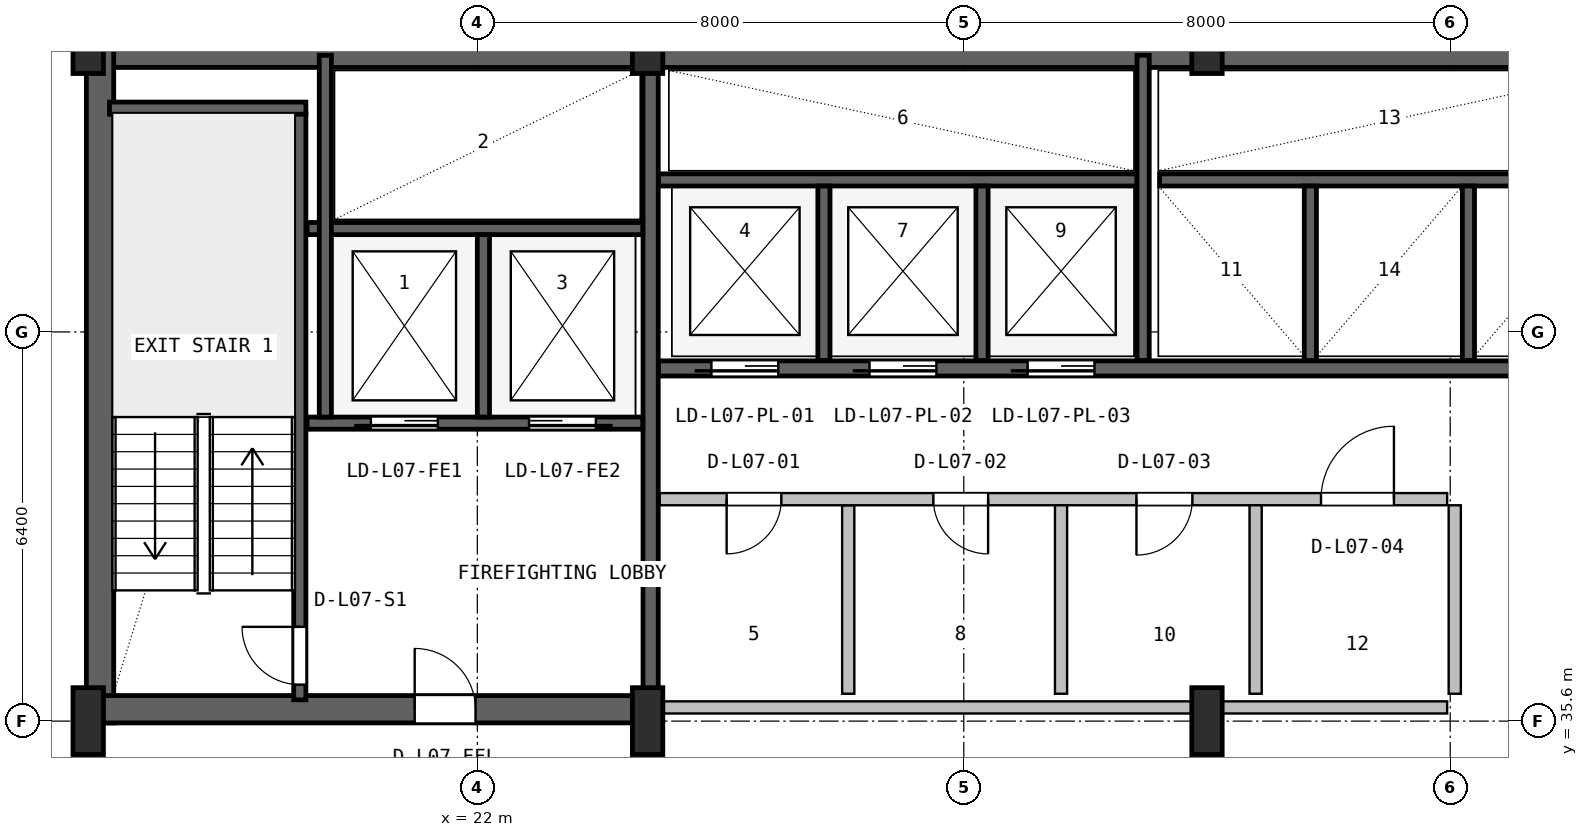
"""IFC4 building model, lengths in metres.
Left out: names, types, materials, properties, quantities, classifications, styles, units other than length and angle.
Written with IfcOpenShell. Run it as: python <this file> out.ifc"""

import sys

from ifc_helpers import new_model, si_unit, direction, frame, frame_2d, origin, origin_2d, place, context, subcontext, project, spatial, rectangle, i_section, extrude, source, transform, mapped, element, fill, save


model = new_model("IFC4")
c1 = context("Model", 3, precision=1e-05, world=origin(), true_north=direction((0.0, 1.0)))
c2 = subcontext(c1, "Body", "Model", "MODEL_VIEW")
j1 = project(units=[si_unit("LENGTHUNIT", "METRE"), si_unit("PLANEANGLEUNIT", "RADIAN")], contexts=[c1])
p1 = place(None, origin())
s1 = spatial("IfcSite", under=j1, at=p1, CompositionType="ELEMENT")
p2 = place(p1, origin())
s2 = spatial("IfcBuilding", under=s1, at=p2, CompositionType="ELEMENT")
p3 = place(p2, frame((0.0, 0.0, 35.4)))
s3 = spatial("IfcBuildingStorey", under=s2, at=p3, CompositionType="ELEMENT", Elevation=35.4)
p4 = place(p3, frame((15.6, 46.575, 0.0), z_axis=(0.0, 0.0, 1.0), x_axis=(1.0, 0.0, 0.0)))
e1 = element("IfcWall", 1, at=p4, inside=s3, PredefinedType="SHEAR", context=c2, shape_type="SweptSolid", body=[
    extrude(rectangle(XDim=36.8, YDim=0.45, at=frame_2d((18.4, 0.0))), origin(), (0.0, 0.0, 1.0), 3.65),
])
p5 = place(p3, frame((15.795, 35.57, 0.0), z_axis=(0.0, 0.0, 1.0), x_axis=(0.0, 1.0, 0.0)))
e2 = element("IfcWall", 2, at=p5, inside=s3, PredefinedType="SHEAR", context=c2, shape_type="SweptSolid", body=[
    extrude(rectangle(XDim=11.23, YDim=0.45, at=frame_2d((5.615, 0.0))), origin(), (0.0, 0.0, 1.0), 3.65),
])
p6 = place(p3, frame((15.57, 35.795, 0.0), z_axis=(0.0, 0.0, 1.0), x_axis=(1.0, 0.0, 0.0)))
e3 = element("IfcWall", 3, at=p6, inside=s3, PredefinedType="SHEAR", context=c2, shape_type="SweptSolid", body=[
    extrude(rectangle(XDim=9.23, YDim=0.45, at=frame_2d((4.615, 0.0))), origin(), (0.0, 0.0, 1.0), 3.65),
])
p7 = place(p6, frame((5.4, 0.0, 0.0)))
e4 = element("IfcOpeningElement", 4, at=p7, cuts=e3, PredefinedType="OPENING", context=c2, shape_type="SweptSolid", body=[
    extrude(rectangle(XDim=1.0, YDim=2.1, at=frame_2d((0.5, 1.05))), frame((0.0, 0.235, 0.0), z_axis=(0.0, -1.0, 0.0), x_axis=(1.0, 0.0, 0.0)), (0.0, 0.0, 1.0), 0.47),
])
m1 = source(origin(), c2, "Body", "SweptSolid", [
    extrude(i_section(OverallWidth=0.5, OverallDepth=1.1, WebThickness=0.018, FlangeThickness=0.032, FilletRadius=0.018, at=origin_2d()), origin(), (0.0, 0.0, 1.0), 3.9),
])
for number, where, z_axis, x_axis in (
    (5, (15.6, 35.6, 0.0), (0.0, 0.0, 1.0), (1.0, 0.0, 0.0)),
    (6, (15.6, 46.8, 0.0), (0.0, 0.0, 1.0), (1.0, 0.0, 0.0)),
    (7, (24.8, 35.6, 0.0), (0.0, 0.0, 1.0), (1.0, 0.0, 0.0)),
    (8, (24.8, 46.8, 0.0), (0.0, 0.0, 1.0), (1.0, 0.0, 0.0)),
    (9, (34.0, 35.6, 0.0), (0.0, 0.0, 1.0), (1.0, 0.0, 0.0)),
    (10, (34.0, 46.8, 0.0), (0.0, 0.0, 1.0), (1.0, 0.0, 0.0)),
):
    element("IfcColumn", number, at=place(p3, frame(where, z_axis=z_axis, x_axis=x_axis)), inside=s3, PredefinedType="COLUMN", context=c2, shape_type="MappedRepresentation", body=[
        mapped(m1, transform((0.0, 0.0, 0.0), x_axis=(1.0, 0.0, 0.0), y_axis=(0.0, 1.0, 0.0), z_axis=(0.0, 0.0, 1.0), scale=1.0)),
    ])
p8 = place(p3, frame((19.08, 35.95, 0.0), z_axis=(0.0, 0.0, 1.0), x_axis=(0.0, 1.0, 0.0)))
e11 = element("IfcWall", 11, at=p8, inside=s3, PredefinedType="SHEAR", context=c2, shape_type="SweptSolid", body=[
    extrude(rectangle(XDim=9.65, YDim=0.2, at=frame_2d((4.825, 0.0))), origin(), (0.0, 0.0, 1.0), 3.65),
])
p9 = place(p8, frame((0.25, 0.0, 0.0)))
e12 = element("IfcOpeningElement", 12, at=p9, cuts=e11, PredefinedType="OPENING", context=c2, shape_type="SweptSolid", body=[
    extrude(rectangle(XDim=0.95, YDim=2.1, at=frame_2d((0.475, 1.05))), frame((0.0, 0.11, 0.0), z_axis=(0.0, -1.0, 0.0), x_axis=(1.0, 0.0, 0.0)), (0.0, 0.0, 1.0), 0.22),
])
p10 = place(p3, frame((15.95, 45.68, 0.0), z_axis=(0.0, 0.0, 1.0), x_axis=(1.0, 0.0, 0.0)))
e13 = element("IfcWall", 13, at=p10, inside=s3, PredefinedType="SHEAR", context=c2, shape_type="SweptSolid", body=[
    extrude(rectangle(XDim=3.23, YDim=0.2, at=frame_2d((1.615, 0.0))), origin(), (0.0, 0.0, 1.0), 3.65),
])
p11 = place(p3, frame((24.85, 36.05, 0.0), z_axis=(0.0, 0.0, 1.0), x_axis=(0.0, 1.0, 0.0)))
e14 = element("IfcWall", 14, at=p11, inside=s3, PredefinedType="SHEAR", context=c2, shape_type="SweptSolid", body=[
    extrude(rectangle(XDim=10.45, YDim=0.25, at=frame_2d((5.225, 0.0))), origin(), (0.0, 0.0, 1.0), 3.65),
])
p12 = place(p3, frame((19.2, 40.5, 0.0), z_axis=(0.0, 0.0, 1.0), x_axis=(1.0, 0.0, 0.0)))
e15 = element("IfcWall", 15, at=p12, inside=s3, PredefinedType="SHEAR", context=c2, shape_type="SweptSolid", body=[
    extrude(rectangle(XDim=5.52, YDim=0.2, at=frame_2d((2.76, 0.0))), origin(), (0.0, 0.0, 1.0), 3.65),
])
p13 = place(p12, frame((1.05, 0.0, 0.0)))
e16 = element("IfcOpeningElement", 16, at=p13, cuts=e15, PredefinedType="OPENING", context=c2, shape_type="SweptSolid", body=[
    extrude(rectangle(XDim=1.1, YDim=2.18, at=frame_2d((0.55, 1.09))), frame((0.0, 0.11, 0.0), z_axis=(0.0, -1.0, 0.0), x_axis=(1.0, 0.0, 0.0)), (0.0, 0.0, 1.0), 0.22),
])
p14 = place(p12, frame((3.65, 0.0, 0.0)))
e17 = element("IfcOpeningElement", 17, at=p14, cuts=e15, PredefinedType="OPENING", context=c2, shape_type="SweptSolid", body=[
    extrude(rectangle(XDim=1.1, YDim=2.18, at=frame_2d((0.55, 1.09))), frame((0.0, 0.11, 0.0), z_axis=(0.0, -1.0, 0.0), x_axis=(1.0, 0.0, 0.0)), (0.0, 0.0, 1.0), 0.22),
])
p15 = place(p3, frame((19.2, 43.7, 0.0), z_axis=(0.0, 0.0, 1.0), x_axis=(1.0, 0.0, 0.0)))
e18 = element("IfcWall", 18, at=p15, inside=s3, PredefinedType="SHEAR", context=c2, shape_type="SweptSolid", body=[
    extrude(rectangle(XDim=5.52, YDim=0.2, at=frame_2d((2.76, 0.0))), origin(), (0.0, 0.0, 1.0), 3.65),
])
p16 = place(p3, frame((22.1, 40.6, 0.0), z_axis=(0.0, 0.0, 1.0), x_axis=(0.0, 1.0, 0.0)))
e19 = element("IfcWall", 19, at=p16, inside=s3, PredefinedType="SHEAR", context=c2, shape_type="SweptSolid", body=[
    extrude(rectangle(XDim=3.0, YDim=0.2, at=frame_2d((1.5, 0.0))), origin(), (0.0, 0.0, 1.0), 3.65),
])
p17 = place(p3, frame((19.5, 40.6, 0.0), z_axis=(0.0, 0.0, 1.0), x_axis=(0.0, 1.0, 0.0)))
e20 = element("IfcWall", 20, at=p17, inside=s3, PredefinedType="SHEAR", context=c2, shape_type="SweptSolid", body=[
    extrude(rectangle(XDim=5.95, YDim=0.2, at=frame_2d((2.975, 0.0))), origin(), (0.0, 0.0, 1.0), 3.65),
])
p18 = place(p3, frame((24.98, 41.4, 0.0), z_axis=(0.0, 0.0, 1.0), x_axis=(1.0, 0.0, 0.0)))
e21 = element("IfcWall", 21, at=p18, inside=s3, PredefinedType="SHEAR", context=c2, shape_type="SweptSolid", body=[
    extrude(rectangle(XDim=23.82, YDim=0.25, at=frame_2d((11.91, 0.0))), origin(), (0.0, 0.0, 1.0), 3.65),
])
p19 = place(p18, frame((0.87, 0.0, 0.0)))
e22 = element("IfcOpeningElement", 22, at=p19, cuts=e21, PredefinedType="OPENING", context=c2, shape_type="SweptSolid", body=[
    extrude(rectangle(XDim=1.1, YDim=2.18, at=frame_2d((0.55, 1.09))), frame((0.0, 0.135, 0.0), z_axis=(0.0, -1.0, 0.0), x_axis=(1.0, 0.0, 0.0)), (0.0, 0.0, 1.0), 0.27),
])
p20 = place(p18, frame((3.47, 0.0, 0.0)))
e23 = element("IfcOpeningElement", 23, at=p20, cuts=e21, PredefinedType="OPENING", context=c2, shape_type="SweptSolid", body=[
    extrude(rectangle(XDim=1.1, YDim=2.18, at=frame_2d((0.55, 1.09))), frame((0.0, 0.135, 0.0), z_axis=(0.0, -1.0, 0.0), x_axis=(1.0, 0.0, 0.0)), (0.0, 0.0, 1.0), 0.27),
])
p21 = place(p18, frame((6.07, 0.0, 0.0)))
e24 = element("IfcOpeningElement", 24, at=p21, cuts=e21, PredefinedType="OPENING", context=c2, shape_type="SweptSolid", body=[
    extrude(rectangle(XDim=1.1, YDim=2.18, at=frame_2d((0.55, 1.09))), frame((0.0, 0.135, 0.0), z_axis=(0.0, -1.0, 0.0), x_axis=(1.0, 0.0, 0.0)), (0.0, 0.0, 1.0), 0.27),
])
p22 = place(p3, frame((24.98, 44.5, 0.0), z_axis=(0.0, 0.0, 1.0), x_axis=(1.0, 0.0, 0.0)))
e25 = element("IfcWall", 25, at=p22, inside=s3, PredefinedType="SHEAR", context=c2, shape_type="SweptSolid", body=[
    extrude(rectangle(XDim=7.87, YDim=0.2, at=frame_2d((3.935, 0.0))), origin(), (0.0, 0.0, 1.0), 3.65),
])
for number, where, z_axis, x_axis in (
    (26, (27.7, 41.53, 0.0), (0.0, 0.0, 1.0), (0.0, 1.0, 0.0)),
    (27, (30.3, 41.53, 0.0), (0.0, 0.0, 1.0), (0.0, 1.0, 0.0)),
):
    element("IfcWall", number, at=place(p3, frame(where, z_axis=z_axis, x_axis=x_axis)), inside=s3, PredefinedType="SHEAR", context=c2, shape_type="SweptSolid", body=[
        extrude(rectangle(XDim=2.87, YDim=0.2, at=frame_2d((1.435, 0.0))), origin(), (0.0, 0.0, 1.0), 3.65),
    ])
p23 = place(p3, frame((32.95, 41.53, 0.0), z_axis=(0.0, 0.0, 1.0), x_axis=(0.0, 1.0, 0.0)))
e28 = element("IfcWall", 28, at=p23, inside=s3, PredefinedType="SHEAR", context=c2, shape_type="SweptSolid", body=[
    extrude(rectangle(XDim=5.02, YDim=0.2, at=frame_2d((2.51, 0.0))), origin(), (0.0, 0.0, 1.0), 3.65),
])
p24 = place(p3, frame((33.22, 44.5, 0.0), z_axis=(0.0, 0.0, 1.0), x_axis=(1.0, 0.0, 0.0)))
e29 = element("IfcWall", 29, at=p24, inside=s3, PredefinedType="SHEAR", context=c2, shape_type="SweptSolid", body=[
    extrude(rectangle(XDim=7.63, YDim=0.2, at=frame_2d((3.815, 0.0))), origin(), (0.0, 0.0, 1.0), 3.65),
])
for number, where, z_axis, x_axis in (
    (30, (35.7, 41.53, 0.0), (0.0, 0.0, 1.0), (0.0, 1.0, 0.0)),
    (31, (38.3, 41.53, 0.0), (0.0, 0.0, 1.0), (0.0, 1.0, 0.0)),
):
    element("IfcWall", number, at=place(p3, frame(where, z_axis=z_axis, x_axis=x_axis)), inside=s3, PredefinedType="SHEAR", context=c2, shape_type="SweptSolid", body=[
        extrude(rectangle(XDim=2.87, YDim=0.2, at=frame_2d((1.435, 0.0))), origin(), (0.0, 0.0, 1.0), 3.65),
    ])
p25 = place(p3, frame((25.0, 35.825, 0.0), z_axis=(0.0, 0.0, 1.0), x_axis=(1.0, 0.0, 0.0)))
e32 = element("IfcWall", 32, at=p25, inside=s3, PredefinedType="SOLIDWALL", context=c2, shape_type="SweptSolid", body=[
    extrude(rectangle(XDim=12.95, YDim=0.2, at=frame_2d((6.475, 0.0))), origin(), (0.0, 0.0, 1.0), 2.425),
])
p26 = place(p3, frame((28.1, 36.05, 0.0), z_axis=(0.0, 0.0, 1.0), x_axis=(0.0, 1.0, 0.0)))
e33 = element("IfcWall", 33, at=p26, inside=s3, PredefinedType="PLUMBINGWALL", context=c2, shape_type="SweptSolid", body=[
    extrude(rectangle(XDim=3.1, YDim=0.2, at=frame_2d((1.55, 0.0))), origin(), (0.0, 0.0, 1.0), 3.63),
])
p27 = place(p3, frame((25.0, 39.25, 0.0), z_axis=(0.0, 0.0, 1.0), x_axis=(1.0, 0.0, 0.0)))
e34 = element("IfcWall", 34, at=p27, inside=s3, PredefinedType="SOLIDWALL", context=c2, shape_type="SweptSolid", body=[
    extrude(rectangle(XDim=12.95, YDim=0.2, at=frame_2d((6.475, 0.0))), origin(), (0.0, 0.0, 1.0), 3.63),
])
p28 = place(p27, frame((1.1, 0.0, 0.0)))
e35 = element("IfcOpeningElement", 35, at=p28, cuts=e34, PredefinedType="OPENING", context=c2, shape_type="SweptSolid", body=[
    extrude(rectangle(XDim=0.9, YDim=2.06, at=frame_2d((0.45, 1.03))), frame((0.0, 0.11, 0.0), z_axis=(0.0, -1.0, 0.0), x_axis=(1.0, 0.0, 0.0)), (0.0, 0.0, 1.0), 0.22),
])
p29 = place(p27, frame((4.5, 0.0, 0.0)))
e36 = element("IfcOpeningElement", 36, at=p29, cuts=e34, PredefinedType="OPENING", context=c2, shape_type="SweptSolid", body=[
    extrude(rectangle(XDim=0.9, YDim=2.06, at=frame_2d((0.45, 1.03))), frame((0.0, 0.11, 0.0), z_axis=(0.0, -1.0, 0.0), x_axis=(1.0, 0.0, 0.0)), (0.0, 0.0, 1.0), 0.22),
])
p30 = place(p27, frame((7.84, 0.0, 0.0)))
e37 = element("IfcOpeningElement", 37, at=p30, cuts=e34, PredefinedType="OPENING", context=c2, shape_type="SweptSolid", body=[
    extrude(rectangle(XDim=0.92, YDim=2.08, at=frame_2d((0.46, 1.04))), frame((0.0, 0.11, 0.0), z_axis=(0.0, -1.0, 0.0), x_axis=(1.0, 0.0, 0.0)), (0.0, 0.0, 1.0), 0.22),
])
p31 = place(p27, frame((10.875, 0.0, 0.0)))
e38 = element("IfcOpeningElement", 38, at=p31, cuts=e34, PredefinedType="OPENING", context=c2, shape_type="SweptSolid", body=[
    extrude(rectangle(XDim=1.2, YDim=2.1, at=frame_2d((0.6, 1.05))), frame((0.0, 0.11, 0.0), z_axis=(0.0, -1.0, 0.0), x_axis=(1.0, 0.0, 0.0)), (0.0, 0.0, 1.0), 0.22),
])
p32 = place(p3, frame((31.6, 36.05, 0.0), z_axis=(0.0, 0.0, 1.0), x_axis=(0.0, 1.0, 0.0)))
e39 = element("IfcWall", 39, at=p32, inside=s3, PredefinedType="PLUMBINGWALL", context=c2, shape_type="SweptSolid", body=[
    extrude(rectangle(XDim=3.1, YDim=0.2, at=frame_2d((1.55, 0.0))), origin(), (0.0, 0.0, 1.0), 3.63),
])
for number, where, z_axis, x_axis in (
    (40, (34.8, 36.05, 0.0), (0.0, 0.0, 1.0), (0.0, 1.0, 0.0)),
    (41, (38.075, 36.05, 0.0), (0.0, 0.0, 1.0), (0.0, 1.0, 0.0)),
):
    element("IfcWall", number, at=place(p3, frame(where, z_axis=z_axis, x_axis=x_axis)), inside=s3, PredefinedType="SOLIDWALL", context=c2, shape_type="SweptSolid", body=[
        extrude(rectangle(XDim=3.1, YDim=0.2, at=frame_2d((1.55, 0.0))), origin(), (0.0, 0.0, 1.0), 3.63),
    ])
m2 = source(origin(), c2, "Body", "SweptSolid", [
    extrude(rectangle(XDim=0.95, YDim=2.1, at=frame_2d((0.475, 1.05))), frame((0.0, 0.025, 0.0), z_axis=(0.0, -1.0, 0.0), x_axis=(1.0, 0.0, 0.0)), (0.0, 0.0, 1.0), 0.05),
])
p33 = place(p9, origin())
e42 = element("IfcDoor", 42, at=p33, inside=s3, OperationType="SINGLE_SWING_RIGHT", PredefinedType="DOOR", context=c2, shape_type="MappedRepresentation", body=[
    mapped(m2, transform((0.0, 0.0, 0.0), x_axis=(1.0, 0.0, 0.0), y_axis=(0.0, 1.0, 0.0), z_axis=(0.0, 0.0, 1.0), scale=1.0)),
])
fill(e12, e42)
m3 = source(origin(), c2, "Body", "SweptSolid", [
    extrude(rectangle(XDim=1.0, YDim=2.1, at=frame_2d((0.5, 1.05))), frame((0.0, 0.025, 0.0), z_axis=(0.0, -1.0, 0.0), x_axis=(1.0, 0.0, 0.0)), (0.0, 0.0, 1.0), 0.05),
])
p34 = place(p7, origin())
e43 = element("IfcDoor", 43, at=p34, inside=s3, OperationType="SINGLE_SWING_LEFT", PredefinedType="DOOR", context=c2, shape_type="MappedRepresentation", body=[
    mapped(m3, transform((0.0, 0.0, 0.0), x_axis=(1.0, 0.0, 0.0), y_axis=(0.0, 1.0, 0.0), z_axis=(0.0, 0.0, 1.0), scale=1.0)),
])
fill(e4, e43)
m4 = source(origin(), c2, "Body", "SweptSolid", [
    extrude(rectangle(XDim=1.1, YDim=2.18, at=frame_2d((0.55, 1.09))), frame((0.0, 0.025, 0.0), z_axis=(0.0, -1.0, 0.0), x_axis=(1.0, 0.0, 0.0)), (0.0, 0.0, 1.0), 0.05),
])
p35 = place(p13, frame((1.1, 0.0, 0.0), z_axis=(0.0, 0.0, 1.0), x_axis=(-1.0, 0.0, 0.0)))
e44 = element("IfcDoor", 44, at=p35, inside=s3, OperationType="SLIDING_TO_LEFT", PredefinedType="DOOR", context=c2, shape_type="MappedRepresentation", body=[
    mapped(m4, transform((0.0, 0.0, 0.0), x_axis=(1.0, 0.0, 0.0), y_axis=(0.0, 1.0, 0.0), z_axis=(0.0, 0.0, 1.0), scale=1.0)),
])
fill(e16, e44)
p36 = place(p14, frame((1.1, 0.0, 0.0), z_axis=(0.0, 0.0, 1.0), x_axis=(-1.0, 0.0, 0.0)))
e45 = element("IfcDoor", 45, at=p36, inside=s3, OperationType="SLIDING_TO_RIGHT", PredefinedType="DOOR", context=c2, shape_type="MappedRepresentation", body=[
    mapped(m4, transform((0.0, 0.0, 0.0), x_axis=(1.0, 0.0, 0.0), y_axis=(0.0, 1.0, 0.0), z_axis=(0.0, 0.0, 1.0), scale=1.0)),
])
fill(e17, e45)
p37 = place(p19, frame((1.1, 0.0, 0.0), z_axis=(0.0, 0.0, 1.0), x_axis=(-1.0, 0.0, 0.0)))
e46 = element("IfcDoor", 46, at=p37, inside=s3, OperationType="SLIDING_TO_LEFT", PredefinedType="DOOR", context=c2, shape_type="MappedRepresentation", body=[
    mapped(m4, transform((0.0, 0.0, 0.0), x_axis=(1.0, 0.0, 0.0), y_axis=(0.0, 1.0, 0.0), z_axis=(0.0, 0.0, 1.0), scale=1.0)),
])
fill(e22, e46)
p38 = place(p20, frame((1.1, 0.0, 0.0), z_axis=(0.0, 0.0, 1.0), x_axis=(-1.0, 0.0, 0.0)))
e47 = element("IfcDoor", 47, at=p38, inside=s3, OperationType="SLIDING_TO_LEFT", PredefinedType="DOOR", context=c2, shape_type="MappedRepresentation", body=[
    mapped(m4, transform((0.0, 0.0, 0.0), x_axis=(1.0, 0.0, 0.0), y_axis=(0.0, 1.0, 0.0), z_axis=(0.0, 0.0, 1.0), scale=1.0)),
])
fill(e23, e47)
p39 = place(p21, frame((1.1, 0.0, 0.0), z_axis=(0.0, 0.0, 1.0), x_axis=(-1.0, 0.0, 0.0)))
e48 = element("IfcDoor", 48, at=p39, inside=s3, OperationType="SLIDING_TO_LEFT", PredefinedType="DOOR", context=c2, shape_type="MappedRepresentation", body=[
    mapped(m4, transform((0.0, 0.0, 0.0), x_axis=(1.0, 0.0, 0.0), y_axis=(0.0, 1.0, 0.0), z_axis=(0.0, 0.0, 1.0), scale=1.0)),
])
fill(e24, e48)
m5 = source(origin(), c2, "Body", "SweptSolid", [
    extrude(rectangle(XDim=0.9, YDim=2.06, at=frame_2d((0.45, 1.03))), frame((0.0, 0.025, 0.0), z_axis=(0.0, -1.0, 0.0), x_axis=(1.0, 0.0, 0.0)), (0.0, 0.0, 1.0), 0.05),
])
p40 = place(p28, frame((0.9, 0.0, 0.0), z_axis=(0.0, 0.0, 1.0), x_axis=(-1.0, 0.0, 0.0)))
e49 = element("IfcDoor", 49, at=p40, inside=s3, OperationType="SINGLE_SWING_LEFT", PredefinedType="DOOR", context=c2, shape_type="MappedRepresentation", body=[
    mapped(m5, transform((0.0, 0.0, 0.0), x_axis=(1.0, 0.0, 0.0), y_axis=(0.0, 1.0, 0.0), z_axis=(0.0, 0.0, 1.0), scale=1.0)),
])
fill(e35, e49)
p41 = place(p29, frame((0.9, 0.0, 0.0), z_axis=(0.0, 0.0, 1.0), x_axis=(-1.0, 0.0, 0.0)))
e50 = element("IfcDoor", 50, at=p41, inside=s3, OperationType="SINGLE_SWING_RIGHT", PredefinedType="DOOR", context=c2, shape_type="MappedRepresentation", body=[
    mapped(m5, transform((0.0, 0.0, 0.0), x_axis=(1.0, 0.0, 0.0), y_axis=(0.0, 1.0, 0.0), z_axis=(0.0, 0.0, 1.0), scale=1.0)),
])
fill(e36, e50)
m6 = source(origin(), c2, "Body", "SweptSolid", [
    extrude(rectangle(XDim=0.92, YDim=2.08, at=frame_2d((0.46, 1.04))), frame((0.0, 0.025, 0.0), z_axis=(0.0, -1.0, 0.0), x_axis=(1.0, 0.0, 0.0)), (0.0, 0.0, 1.0), 0.05),
])
p42 = place(p30, frame((0.92, 0.0, 0.0), z_axis=(0.0, 0.0, 1.0), x_axis=(-1.0, 0.0, 0.0)))
e51 = element("IfcDoor", 51, at=p42, inside=s3, OperationType="SINGLE_SWING_LEFT", PredefinedType="DOOR", context=c2, shape_type="MappedRepresentation", body=[
    mapped(m6, transform((0.0, 0.0, 0.0), x_axis=(1.0, 0.0, 0.0), y_axis=(0.0, 1.0, 0.0), z_axis=(0.0, 0.0, 1.0), scale=1.0)),
])
fill(e37, e51)
m7 = source(origin(), c2, "Body", "SweptSolid", [
    extrude(rectangle(XDim=1.2, YDim=2.1, at=frame_2d((0.6, 1.05))), frame((0.0, 0.025, 0.0), z_axis=(0.0, -1.0, 0.0), x_axis=(1.0, 0.0, 0.0)), (0.0, 0.0, 1.0), 0.05),
])
p43 = place(p31, origin())
e52 = element("IfcDoor", 52, at=p43, inside=s3, OperationType="SINGLE_SWING_RIGHT", PredefinedType="DOOR", context=c2, shape_type="MappedRepresentation", body=[
    mapped(m7, transform((0.0, 0.0, 0.0), x_axis=(1.0, 0.0, 0.0), y_axis=(0.0, 1.0, 0.0), z_axis=(0.0, 0.0, 1.0), scale=1.0)),
])
fill(e38, e52)
save(model, sys.argv[1])
